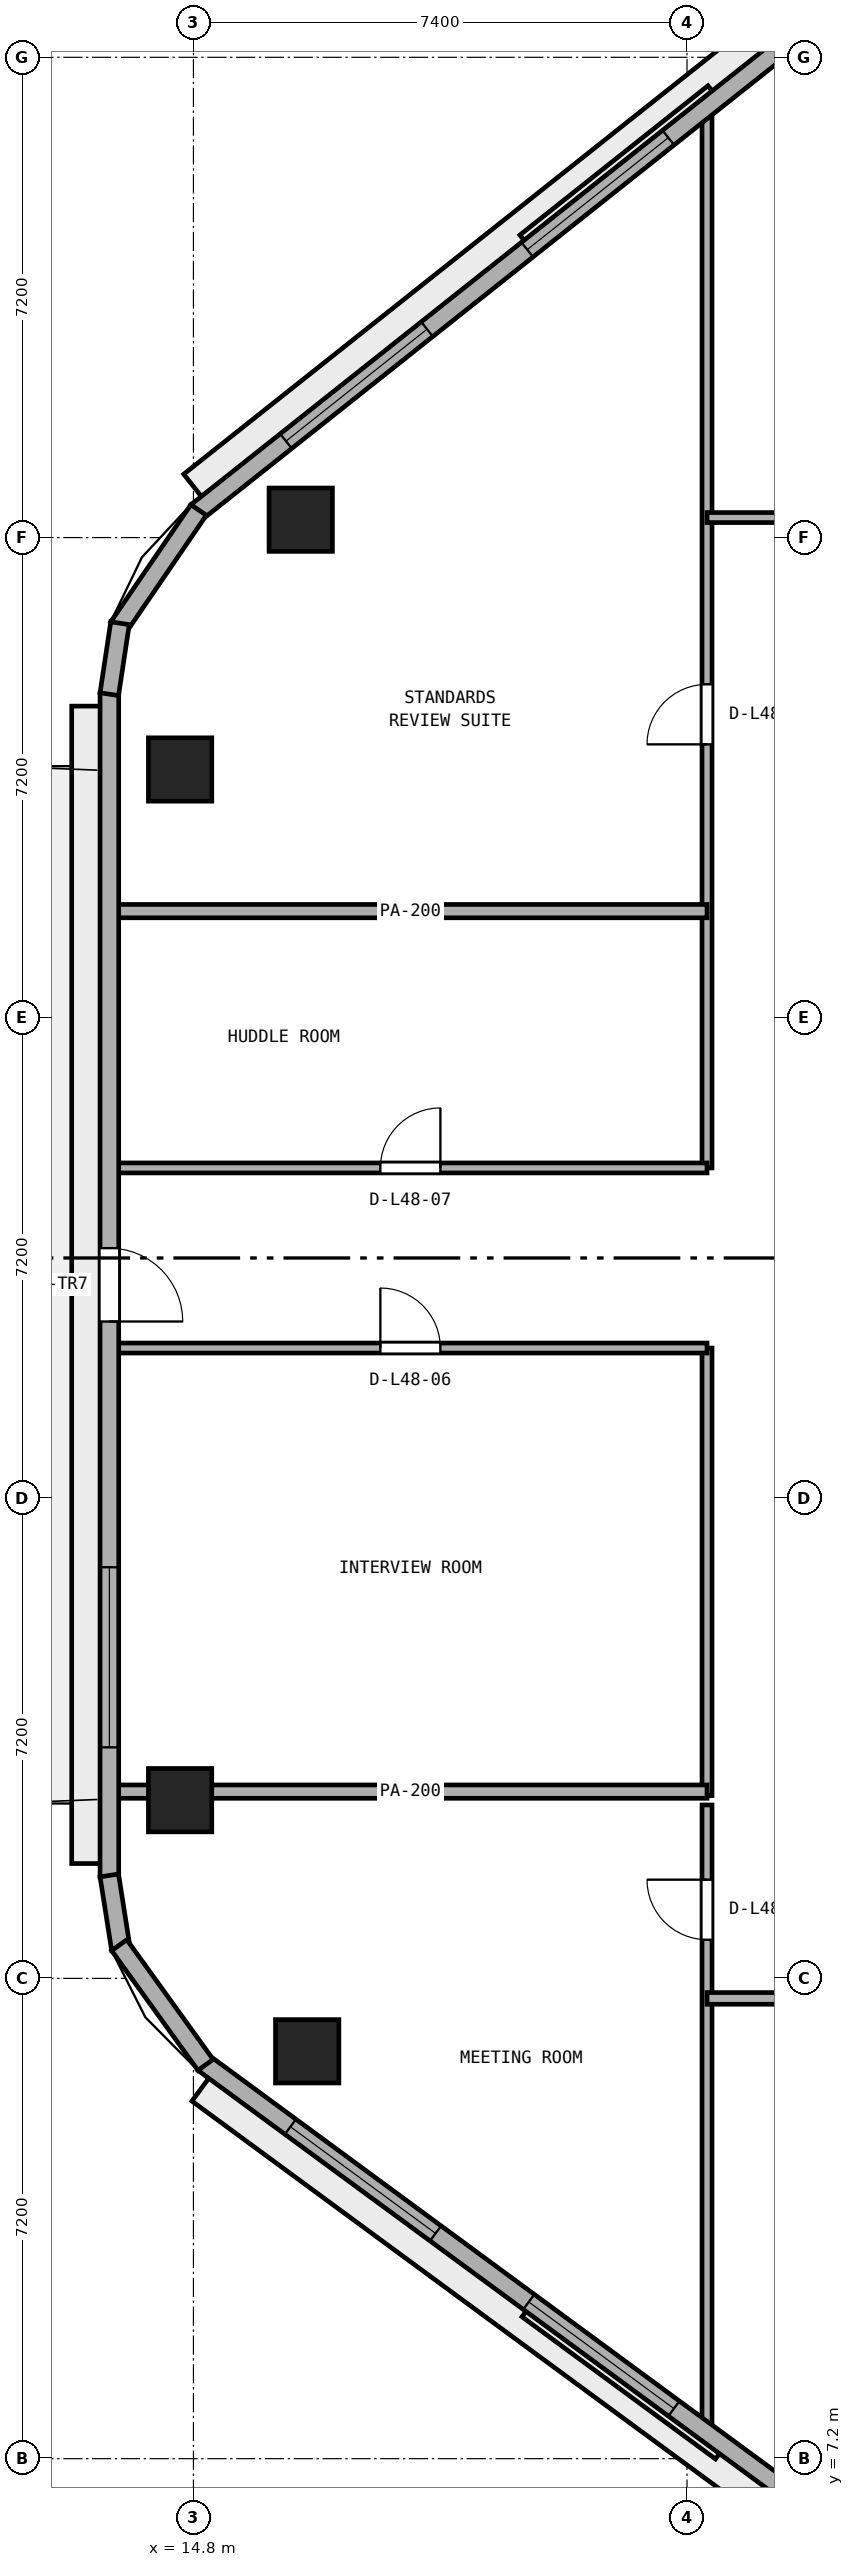
"""IFC4 building model, lengths in metres.
Left out: names, types, materials, properties, quantities, classifications, styles, units other than length and angle.
Written with IfcOpenShell. Run it as: python <this file> out.ifc"""

import sys

from ifc_helpers import new_model, si_unit, direction, frame, frame_2d, origin, origin_2d, place, context, subcontext, project, spatial, rectangle, extrude, element, fill, save


model = new_model("IFC4")
c1 = context("Model", 3, precision=1e-05, world=origin(), true_north=direction((0.0, 1.0)))
c2 = subcontext(c1, "Body", "Model", "MODEL_VIEW")
j1 = project(units=[si_unit("LENGTHUNIT", "METRE"), si_unit("PLANEANGLEUNIT", "RADIAN")], contexts=[c1])
p1 = place(None, origin())
s1 = spatial("IfcSite", under=j1, at=p1, CompositionType="ELEMENT")
p2 = place(p1, origin())
s2 = spatial("IfcBuilding", under=s1, at=p2, CompositionType="ELEMENT")
p3 = place(p2, frame((0.0, 0.0, 189.6)))
s3 = spatial("IfcBuildingStorey", under=s2, at=p3, CompositionType="ELEMENT", Elevation=189.6)
for number, where, z_axis, x_axis in (
    (1, (16.409, 36.268, 0.0), (0.0, 0.0, 1.0), (1.0, 0.0, 0.0)),
    (2, (14.6, 32.523, 0.0), (0.0, 0.0, 1.0), (1.0, 0.0, 0.0)),
    (3, (14.6, 17.072, 0.0), (0.0, 0.0, 1.0), (1.0, 0.0, 0.0)),
    (4, (16.505, 13.307, 0.0), (0.0, 0.0, 1.0), (1.0, 0.0, 0.0)),
):
    element("IfcColumn", number, at=place(p3, frame(where, z_axis=z_axis, x_axis=x_axis)), inside=s3, PredefinedType="COLUMN", context=c2, shape_type="SweptSolid", body=[
        extrude(rectangle(XDim=0.95, YDim=0.95, at=origin_2d()), origin(), (0.0, 0.0, 1.0), 3.8),
    ])
p4 = place(p3, frame((22.5, 7.552, 0.0), z_axis=(0.0, 0.0, 1.0), x_axis=(0.0, 1.0, 0.0)))
e5 = element("IfcWall", 5, at=p4, inside=s3, PredefinedType="PARTITIONING", context=c2, shape_type="SweptSolid", body=[
    extrude(rectangle(XDim=9.448, YDim=0.15, at=frame_2d((4.724, 0.0))), origin(), (0.0, 0.0, 1.0), 3.54),
])
p5 = place(p4, frame((7.427, 0.0, 0.0)))
e6 = element("IfcOpeningElement", 6, at=p5, cuts=e5, PredefinedType="OPENING", context=c2, shape_type="SweptSolid", body=[
    extrude(rectangle(XDim=0.9, YDim=2.1, at=frame_2d((0.45, 1.05))), frame((0.0, 0.085, 0.0), z_axis=(0.0, -1.0, 0.0), x_axis=(1.0, 0.0, 0.0)), (0.0, 0.0, 1.0), 0.17),
])
p6 = place(p3, frame((22.5, 17.14, 0.0), z_axis=(0.0, 0.0, 1.0), x_axis=(0.0, 1.0, 0.0)))
e7 = element("IfcWall", 7, at=p6, inside=s3, PredefinedType="PARTITIONING", context=c2, shape_type="SweptSolid", body=[
    extrude(rectangle(XDim=6.71, YDim=0.15, at=frame_2d((3.355, 0.0))), origin(), (0.0, 0.0, 1.0), 3.54),
])
p7 = place(p3, frame((22.5, 26.55, 0.0), z_axis=(0.0, 0.0, 1.0), x_axis=(0.0, 1.0, 0.0)))
e8 = element("IfcWall", 8, at=p7, inside=s3, PredefinedType="PARTITIONING", context=c2, shape_type="SweptSolid", body=[
    extrude(rectangle(XDim=15.945, YDim=0.15, at=frame_2d((7.972, 0.0))), origin(), (0.0, 0.0, 1.0), 3.54),
])
p8 = place(p7, frame((6.35, 0.0, 0.0)))
e9 = element("IfcOpeningElement", 9, at=p8, cuts=e8, PredefinedType="OPENING", context=c2, shape_type="SweptSolid", body=[
    extrude(rectangle(XDim=0.9, YDim=2.1, at=frame_2d((0.45, 1.05))), frame((0.0, 0.085, 0.0), z_axis=(0.0, -1.0, 0.0), x_axis=(1.0, 0.0, 0.0)), (0.0, 0.0, 1.0), 0.17),
])
p9 = place(p3, frame((22.5, 14.1, 0.0), z_axis=(0.0, 0.0, 1.0), x_axis=(1.0, 0.0, 0.0)))
e10 = element("IfcWall", 10, at=p9, inside=s3, PredefinedType="PARTITIONING", context=c2, shape_type="SweptSolid", body=[
    extrude(rectangle(XDim=29.0, YDim=0.175, at=frame_2d((14.5, 0.0))), origin(), (0.0, 0.0, 1.0), 3.54),
])
p10 = place(p9, frame((7.57, 0.0, 0.0)))
e11 = element("IfcOpeningElement", 11, at=p10, cuts=e10, PredefinedType="OPENING", context=c2, shape_type="SweptSolid", body=[
    extrude(rectangle(XDim=1.0, YDim=2.12, at=frame_2d((0.5, 1.06))), frame((0.0, 0.097, 0.0), z_axis=(0.0, -1.0, 0.0), x_axis=(1.0, 0.0, 0.0)), (0.0, 0.0, 1.0), 0.195),
])
p11 = place(p9, frame((21.88, 0.0, 0.0)))
e12 = element("IfcOpeningElement", 12, at=p11, cuts=e10, PredefinedType="OPENING", context=c2, shape_type="SweptSolid", body=[
    extrude(rectangle(XDim=0.9, YDim=2.1, at=frame_2d((0.45, 1.05))), frame((0.0, 0.097, 0.0), z_axis=(0.0, -1.0, 0.0), x_axis=(1.0, 0.0, 0.0)), (0.0, 0.0, 1.0), 0.195),
])
p12 = place(p3, frame((13.605, 17.2, 0.0), z_axis=(0.0, 0.0, 1.0), x_axis=(1.0, 0.0, 0.0)))
e13 = element("IfcWall", 13, at=p12, inside=s3, PredefinedType="PARTITIONING", context=c2, shape_type="SweptSolid", body=[
    extrude(rectangle(XDim=8.895, YDim=0.2, at=frame_2d((4.448, 0.0))), origin(), (0.0, 0.0, 1.0), 2.923),
])
p13 = place(p3, frame((13.605, 23.85, 0.0), z_axis=(0.0, 0.0, 1.0), x_axis=(1.0, 0.0, 0.0)))
e14 = element("IfcWall", 14, at=p13, inside=s3, PredefinedType="PARTITIONING", context=c2, shape_type="SweptSolid", body=[
    extrude(rectangle(XDim=8.895, YDim=0.15, at=frame_2d((4.448, 0.0))), origin(), (0.0, 0.0, 1.0), 3.54),
])
p14 = place(p13, frame((3.998, 0.0, 0.0)))
e15 = element("IfcOpeningElement", 15, at=p14, cuts=e14, PredefinedType="OPENING", context=c2, shape_type="SweptSolid", body=[
    extrude(rectangle(XDim=0.9, YDim=2.1, at=frame_2d((0.45, 1.05))), frame((0.0, 0.085, 0.0), z_axis=(0.0, -1.0, 0.0), x_axis=(1.0, 0.0, 0.0)), (0.0, 0.0, 1.0), 0.17),
])
p15 = place(p3, frame((13.605, 26.55, 0.0), z_axis=(0.0, 0.0, 1.0), x_axis=(1.0, 0.0, 0.0)))
e16 = element("IfcWall", 16, at=p15, inside=s3, PredefinedType="PARTITIONING", context=c2, shape_type="SweptSolid", body=[
    extrude(rectangle(XDim=8.895, YDim=0.15, at=frame_2d((4.448, 0.0))), origin(), (0.0, 0.0, 1.0), 3.54),
])
p16 = place(p15, frame((3.998, 0.0, 0.0)))
e17 = element("IfcOpeningElement", 17, at=p16, cuts=e16, PredefinedType="OPENING", context=c2, shape_type="SweptSolid", body=[
    extrude(rectangle(XDim=0.9, YDim=2.1, at=frame_2d((0.45, 1.05))), frame((0.0, 0.085, 0.0), z_axis=(0.0, -1.0, 0.0), x_axis=(1.0, 0.0, 0.0)), (0.0, 0.0, 1.0), 0.17),
])
p17 = place(p3, frame((13.605, 30.4, 0.0), z_axis=(0.0, 0.0, 1.0), x_axis=(1.0, 0.0, 0.0)))
e18 = element("IfcWall", 18, at=p17, inside=s3, PredefinedType="PARTITIONING", context=c2, shape_type="SweptSolid", body=[
    extrude(rectangle(XDim=8.895, YDim=0.2, at=frame_2d((4.448, 0.0))), origin(), (0.0, 0.0, 1.0), 3.54),
])
p18 = place(p3, frame((22.5, 36.3, 0.0), z_axis=(0.0, 0.0, 1.0), x_axis=(1.0, 0.0, 0.0)))
e19 = element("IfcWall", 19, at=p18, inside=s3, PredefinedType="PARTITIONING", context=c2, shape_type="SweptSolid", body=[
    extrude(rectangle(XDim=11.9, YDim=0.15, at=frame_2d((5.95, 0.0))), origin(), (0.0, 0.0, 1.0), 3.54),
])
p19 = place(p18, frame((3.17, 0.0, 0.0)))
e20 = element("IfcOpeningElement", 20, at=p19, cuts=e19, PredefinedType="OPENING", context=c2, shape_type="SweptSolid", body=[
    extrude(rectangle(XDim=1.0, YDim=2.12, at=frame_2d((0.5, 1.06))), frame((0.0, 0.085, 0.0), z_axis=(0.0, -1.0, 0.0), x_axis=(1.0, 0.0, 0.0)), (0.0, 0.0, 1.0), 0.17),
])
p20 = place(p18, frame((8.88, 0.0, 0.0)))
e21 = element("IfcOpeningElement", 21, at=p20, cuts=e19, PredefinedType="OPENING", context=c2, shape_type="SweptSolid", body=[
    extrude(rectangle(XDim=1.0, YDim=2.12, at=frame_2d((0.5, 1.06))), frame((0.0, 0.085, 0.0), z_axis=(0.0, -1.0, 0.0), x_axis=(1.0, 0.0, 0.0)), (0.0, 0.0, 1.0), 0.17),
])
p21 = place(p3, frame((27.658, 46.55, 0.0), z_axis=(0.0, 0.0, 1.0), x_axis=(-0.783266285861, -0.621686356158, 0.0)))
e22 = element("IfcWall", 22, at=p21, inside=s3, PredefinedType="STANDARD", context=c2, shape_type="SweptSolid", body=[
    extrude(rectangle(XDim=16.353, YDim=0.28, at=frame_2d((8.177, 0.0))), origin(), (0.0, 0.0, 1.0), 3.54),
])
p22 = place(p21, frame((1.709, 0.0, 0.9)))
e23 = element("IfcOpeningElement", 23, at=p22, cuts=e22, PredefinedType="OPENING", context=c2, shape_type="SweptSolid", body=[
    extrude(rectangle(XDim=2.7, YDim=1.75, at=frame_2d((1.35, 0.875))), frame((0.0, 0.15, 0.0), z_axis=(0.0, -1.0, 0.0), x_axis=(1.0, 0.0, 0.0)), (0.0, 0.0, 1.0), 0.3),
])
p23 = place(p21, frame((7.326, 0.0, 0.9)))
e24 = element("IfcOpeningElement", 24, at=p23, cuts=e22, PredefinedType="OPENING", context=c2, shape_type="SweptSolid", body=[
    extrude(rectangle(XDim=2.7, YDim=1.75, at=frame_2d((1.35, 0.875))), frame((0.0, 0.15, 0.0), z_axis=(0.0, -1.0, 0.0), x_axis=(1.0, 0.0, 0.0)), (0.0, 0.0, 1.0), 0.3),
])
p24 = place(p21, frame((11.944, 0.0, 0.9)))
e25 = element("IfcOpeningElement", 25, at=p24, cuts=e22, PredefinedType="OPENING", context=c2, shape_type="SweptSolid", body=[
    extrude(rectangle(XDim=2.7, YDim=1.75, at=frame_2d((1.35, 0.875))), frame((0.0, 0.15, 0.0), z_axis=(0.0, -1.0, 0.0), x_axis=(1.0, 0.0, 0.0)), (0.0, 0.0, 1.0), 0.3),
])
p25 = place(p3, frame((13.54, 33.673, 0.0), z_axis=(0.0, 0.0, 1.0), x_axis=(0.0, -1.0, 0.0)))
e26 = element("IfcWall", 26, at=p25, inside=s3, PredefinedType="STANDARD", context=c2, shape_type="SweptSolid", body=[
    extrude(rectangle(XDim=17.751, YDim=0.28, at=frame_2d((8.875, 0.0))), origin(), (0.0, 0.0, 1.0), 3.54),
])
p26 = place(p25, frame((8.326, 0.0, 0.0)))
e27 = element("IfcOpeningElement", 27, at=p26, cuts=e26, PredefinedType="OPENING", context=c2, shape_type="SweptSolid", body=[
    extrude(rectangle(XDim=1.1, YDim=2.2, at=frame_2d((0.55, 1.1))), frame((0.0, 0.15, 0.0), z_axis=(0.0, -1.0, 0.0), x_axis=(1.0, 0.0, 0.0)), (0.0, 0.0, 1.0), 0.3),
])
p27 = place(p25, frame((13.109, 0.0, 0.9)))
e28 = element("IfcOpeningElement", 28, at=p27, cuts=e26, PredefinedType="OPENING", context=c2, shape_type="SweptSolid", body=[
    extrude(rectangle(XDim=2.7, YDim=1.75, at=frame_2d((1.35, 0.875))), frame((0.0, 0.15, 0.0), z_axis=(0.0, -1.0, 0.0), x_axis=(1.0, 0.0, 0.0)), (0.0, 0.0, 1.0), 0.3),
])
p28 = place(p3, frame((14.951, 13.134, 0.0), z_axis=(0.0, 0.0, 1.0), x_axis=(0.805804940328, -0.592181051827, 0.0)))
e29 = element("IfcWall", 29, at=p28, inside=s3, PredefinedType="STANDARD", context=c2, shape_type="SweptSolid", body=[
    extrude(rectangle(XDim=15.804, YDim=0.28, at=frame_2d((7.902, 0.0))), origin(), (0.0, 0.0, 1.0), 3.54),
])
p29 = place(p28, frame((1.617, 0.0, 0.9)))
e30 = element("IfcOpeningElement", 30, at=p29, cuts=e29, PredefinedType="OPENING", context=c2, shape_type="SweptSolid", body=[
    extrude(rectangle(XDim=2.7, YDim=1.75, at=frame_2d((1.35, 0.875))), frame((0.0, 0.15, 0.0), z_axis=(0.0, -1.0, 0.0), x_axis=(1.0, 0.0, 0.0)), (0.0, 0.0, 1.0), 0.3),
])
p30 = place(p28, frame((6.052, 0.0, 0.9)))
e31 = element("IfcOpeningElement", 31, at=p30, cuts=e29, PredefinedType="OPENING", context=c2, shape_type="SweptSolid", body=[
    extrude(rectangle(XDim=2.7, YDim=1.75, at=frame_2d((1.35, 0.875))), frame((0.0, 0.15, 0.0), z_axis=(0.0, -1.0, 0.0), x_axis=(1.0, 0.0, 0.0)), (0.0, 0.0, 1.0), 0.3),
])
p31 = place(p28, frame((11.487, 0.0, 0.9)))
e32 = element("IfcOpeningElement", 32, at=p31, cuts=e29, PredefinedType="OPENING", context=c2, shape_type="SweptSolid", body=[
    extrude(rectangle(XDim=2.7, YDim=1.75, at=frame_2d((1.35, 0.875))), frame((0.0, 0.15, 0.0), z_axis=(0.0, -1.0, 0.0), x_axis=(1.0, 0.0, 0.0)), (0.0, 0.0, 1.0), 0.3),
])
p32 = place(p3, frame((14.878, 36.414, 0.0), z_axis=(0.0, 0.0, 1.0), x_axis=(-0.564564614133, -0.825388875906, 0.0)))
e33 = element("IfcWall", 33, at=p32, inside=s3, PredefinedType="STANDARD", context=c2, shape_type="SweptSolid", body=[
    extrude(rectangle(XDim=2.128, YDim=0.28, at=frame_2d((1.064, 0.0))), origin(), (0.0, 0.0, 1.0), 3.54),
])
p33 = place(p3, frame((13.699, 34.716, 0.0), z_axis=(0.0, 0.0, 1.0), x_axis=(-0.149549920187, -0.988754176412, 0.0)))
e34 = element("IfcWall", 34, at=p33, inside=s3, PredefinedType="STANDARD", context=c2, shape_type="SweptSolid", body=[
    extrude(rectangle(XDim=1.076, YDim=0.28, at=frame_2d((0.538, 0.0))), origin(), (0.0, 0.0, 1.0), 3.54),
])
p34 = place(p3, frame((13.538, 15.944, 0.0), z_axis=(0.0, 0.0, 1.0), x_axis=(0.155447556013, -0.987844146275, 0.0)))
e35 = element("IfcWall", 35, at=p34, inside=s3, PredefinedType="STANDARD", context=c2, shape_type="SweptSolid", body=[
    extrude(rectangle(XDim=1.12, YDim=0.28, at=frame_2d((0.56, 0.0))), origin(), (0.0, 0.0, 1.0), 3.54),
])
p35 = place(p3, frame((13.688, 14.898, 0.0), z_axis=(0.0, 0.0, 1.0), x_axis=(0.584833657716, -0.811153248655, 0.0)))
e36 = element("IfcWall", 36, at=p35, inside=s3, PredefinedType="STANDARD", context=c2, shape_type="SweptSolid", body=[
    extrude(rectangle(XDim=2.212, YDim=0.28, at=frame_2d((1.106, 0.0))), origin(), (0.0, 0.0, 1.0), 3.54),
])
p36 = place(p5, origin())
e37 = element("IfcDoor", 37, at=p36, inside=s3, OperationType="SINGLE_SWING_RIGHT", PredefinedType="DOOR", context=c2, shape_type="SweptSolid", body=[
    extrude(rectangle(XDim=0.9, YDim=2.1, at=frame_2d((0.45, 1.05))), frame((0.0, 0.025, 0.0), z_axis=(0.0, -1.0, 0.0), x_axis=(1.0, 0.0, 0.0)), (0.0, 0.0, 1.0), 0.05),
])
fill(e6, e37)
p37 = place(p14, origin())
e38 = element("IfcDoor", 38, at=p37, inside=s3, OperationType="SINGLE_SWING_LEFT", PredefinedType="DOOR", context=c2, shape_type="SweptSolid", body=[
    extrude(rectangle(XDim=0.9, YDim=2.1, at=frame_2d((0.45, 1.05))), frame((0.0, 0.025, 0.0), z_axis=(0.0, -1.0, 0.0), x_axis=(1.0, 0.0, 0.0)), (0.0, 0.0, 1.0), 0.05),
])
fill(e15, e38)
p38 = place(p16, origin())
e39 = element("IfcDoor", 39, at=p38, inside=s3, OperationType="SINGLE_SWING_RIGHT", PredefinedType="DOOR", context=c2, shape_type="SweptSolid", body=[
    extrude(rectangle(XDim=0.9, YDim=2.1, at=frame_2d((0.45, 1.05))), frame((0.0, 0.025, 0.0), z_axis=(0.0, -1.0, 0.0), x_axis=(1.0, 0.0, 0.0)), (0.0, 0.0, 1.0), 0.05),
])
fill(e17, e39)
p39 = place(p8, origin())
e40 = element("IfcDoor", 40, at=p39, inside=s3, OperationType="SINGLE_SWING_LEFT", PredefinedType="DOOR", context=c2, shape_type="SweptSolid", body=[
    extrude(rectangle(XDim=0.9, YDim=2.1, at=frame_2d((0.45, 1.05))), frame((0.0, 0.025, 0.0), z_axis=(0.0, -1.0, 0.0), x_axis=(1.0, 0.0, 0.0)), (0.0, 0.0, 1.0), 0.05),
])
fill(e9, e40)
p40 = place(p23, origin())
e41 = element("IfcWindow", 41, at=p40, inside=s3, PartitioningType="SINGLE_PANEL", PredefinedType="WINDOW", context=c2, shape_type="SweptSolid", body=[
    extrude(rectangle(XDim=2.7, YDim=1.75, at=frame_2d((1.35, 0.875))), frame((0.0, 0.03, 0.0), z_axis=(0.0, -1.0, 0.0), x_axis=(1.0, 0.0, 0.0)), (0.0, 0.0, 1.0), 0.06),
])
fill(e24, e41)
p41 = place(p24, origin())
e42 = element("IfcWindow", 42, at=p41, inside=s3, PartitioningType="SINGLE_PANEL", PredefinedType="WINDOW", context=c2, shape_type="SweptSolid", body=[
    extrude(rectangle(XDim=2.7, YDim=1.75, at=frame_2d((1.35, 0.875))), frame((0.0, 0.03, 0.0), z_axis=(0.0, -1.0, 0.0), x_axis=(1.0, 0.0, 0.0)), (0.0, 0.0, 1.0), 0.06),
])
fill(e25, e42)
p42 = place(p26, origin())
e43 = element("IfcDoor", 43, at=p42, inside=s3, OperationType="SINGLE_SWING_RIGHT", PredefinedType="DOOR", context=c2, shape_type="SweptSolid", body=[
    extrude(rectangle(XDim=1.1, YDim=2.2, at=frame_2d((0.55, 1.1))), frame((0.0, 0.025, 0.0), z_axis=(0.0, -1.0, 0.0), x_axis=(1.0, 0.0, 0.0)), (0.0, 0.0, 1.0), 0.05),
])
fill(e27, e43)
p43 = place(p27, origin())
e44 = element("IfcWindow", 44, at=p43, inside=s3, PartitioningType="SINGLE_PANEL", PredefinedType="WINDOW", context=c2, shape_type="SweptSolid", body=[
    extrude(rectangle(XDim=2.7, YDim=1.75, at=frame_2d((1.35, 0.875))), frame((0.0, 0.03, 0.0), z_axis=(0.0, -1.0, 0.0), x_axis=(1.0, 0.0, 0.0)), (0.0, 0.0, 1.0), 0.06),
])
fill(e28, e44)
p44 = place(p29, origin())
e45 = element("IfcWindow", 45, at=p44, inside=s3, PartitioningType="SINGLE_PANEL", PredefinedType="WINDOW", context=c2, shape_type="SweptSolid", body=[
    extrude(rectangle(XDim=2.7, YDim=1.75, at=frame_2d((1.35, 0.875))), frame((0.0, 0.03, 0.0), z_axis=(0.0, -1.0, 0.0), x_axis=(1.0, 0.0, 0.0)), (0.0, 0.0, 1.0), 0.06),
])
fill(e30, e45)
p45 = place(p30, origin())
e46 = element("IfcWindow", 46, at=p45, inside=s3, PartitioningType="SINGLE_PANEL", PredefinedType="WINDOW", context=c2, shape_type="SweptSolid", body=[
    extrude(rectangle(XDim=2.7, YDim=1.75, at=frame_2d((1.35, 0.875))), frame((0.0, 0.03, 0.0), z_axis=(0.0, -1.0, 0.0), x_axis=(1.0, 0.0, 0.0)), (0.0, 0.0, 1.0), 0.06),
])
fill(e31, e46)
save(model, sys.argv[1])
